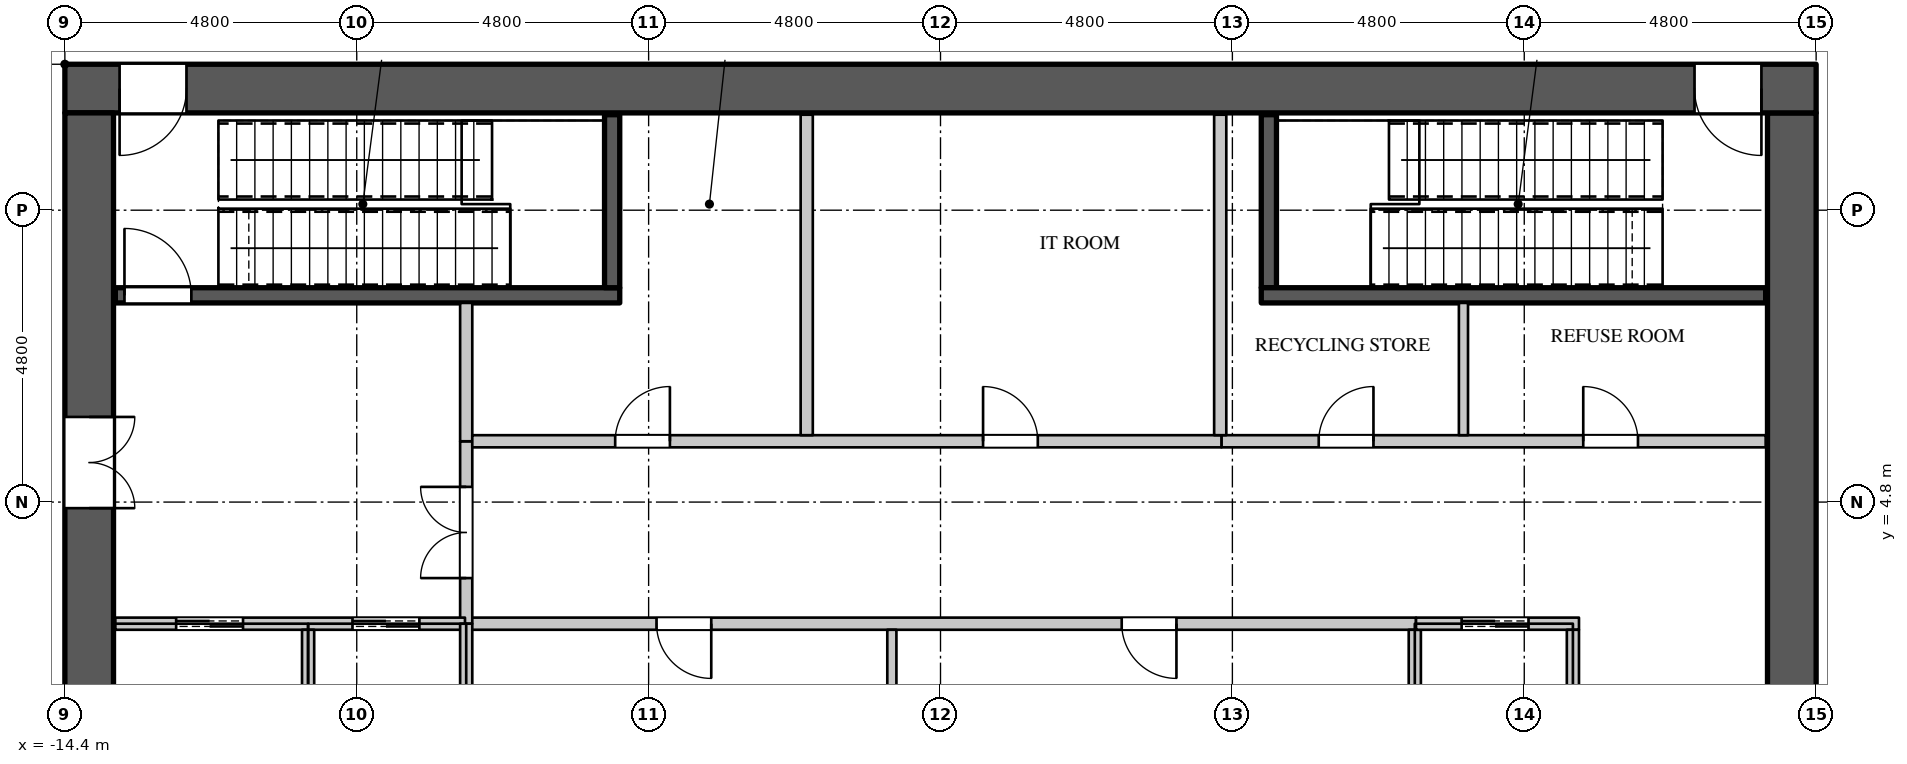
"""IFC4 building model, lengths in metres.
Left out: names, types, materials, properties, quantities, classifications, styles, units other than length and angle.
Written with IfcOpenShell. Run it as: python <this file> out.ifc"""

import sys

from ifc_helpers import new_model, si_unit, direction, frame, frame_2d, origin, place, context, subcontext, project, spatial, rectangle, extrude, element, fill, save


model = new_model("IFC4")
c1 = context("Model", 3, precision=1e-05, world=origin(), true_north=direction((0.0, 1.0)))
c2 = subcontext(c1, "Body", "Model", "MODEL_VIEW")
j1 = project(units=[si_unit("LENGTHUNIT", "METRE"), si_unit("PLANEANGLEUNIT", "RADIAN")], contexts=[c1])
p1 = place(None, origin())
s1 = spatial("IfcSite", under=j1, at=p1, CompositionType="ELEMENT")
p2 = place(p1, origin())
s2 = spatial("IfcBuilding", under=s1, at=p2, CompositionType="ELEMENT")
p3 = place(p2, frame((0.0, 0.0, 156.9)))
s3 = spatial("IfcBuildingStorey", under=s2, at=p3, CompositionType="ELEMENT", Elevation=156.9)
p4 = place(p3, frame((-14.4, 11.6, 0.0), z_axis=(0.0, 0.0, 1.0), x_axis=(1.0, 0.0, 0.0)))
e1 = element("IfcWall", 1, at=p4, inside=s3, PredefinedType="SHEAR", context=c2, shape_type="SweptSolid", body=[
    extrude(rectangle(XDim=28.8, YDim=0.8, at=frame_2d((14.4, 0.0))), origin(), (0.0, 0.0, 1.0), 5.4),
])
p5 = place(p4, frame((0.9, 0.0, 0.0)))
e2 = element("IfcOpeningElement", 2, at=p5, cuts=e1, PredefinedType="OPENING", context=c2, shape_type="SweptSolid", body=[
    extrude(rectangle(XDim=1.1, YDim=2.2, at=frame_2d((0.55, 1.1))), frame((0.0, 0.41, 0.0), z_axis=(0.0, -1.0, 0.0), x_axis=(1.0, 0.0, 0.0)), (0.0, 0.0, 1.0), 0.82),
])
p6 = place(p4, frame((26.8, 0.0, 0.0)))
e3 = element("IfcOpeningElement", 3, at=p6, cuts=e1, PredefinedType="OPENING", context=c2, shape_type="SweptSolid", body=[
    extrude(rectangle(XDim=1.1, YDim=2.2, at=frame_2d((0.55, 1.1))), frame((0.0, 0.41, 0.0), z_axis=(0.0, -1.0, 0.0), x_axis=(1.0, 0.0, 0.0)), (0.0, 0.0, 1.0), 0.82),
])
p7 = place(p3, frame((14.0, -11.2, 0.0), z_axis=(0.0, 0.0, 1.0), x_axis=(0.0, 1.0, 0.0)))
e4 = element("IfcWall", 4, at=p7, inside=s3, PredefinedType="SHEAR", context=c2, shape_type="SweptSolid", body=[
    extrude(rectangle(XDim=22.4, YDim=0.8, at=frame_2d((11.2, 0.0))), origin(), (0.0, 0.0, 1.0), 5.4),
])
p8 = place(p7, frame((10.4, 0.0, 0.0)))
e5 = element("IfcOpeningElement", 5, at=p8, cuts=e4, PredefinedType="OPENING", context=c2, shape_type="SweptSolid", body=[
    extrude(rectangle(XDim=1.5, YDim=2.4, at=frame_2d((0.75, 1.2))), frame((0.0, 0.41, 0.0), z_axis=(0.0, -1.0, 0.0), x_axis=(1.0, 0.0, 0.0)), (0.0, 0.0, 1.0), 0.82),
])
p9 = place(p3, frame((-14.0, -11.2, 0.0), z_axis=(0.0, 0.0, 1.0), x_axis=(0.0, 1.0, 0.0)))
e6 = element("IfcWall", 6, at=p9, inside=s3, PredefinedType="SHEAR", context=c2, shape_type="SweptSolid", body=[
    extrude(rectangle(XDim=22.4, YDim=0.8, at=frame_2d((11.2, 0.0))), origin(), (0.0, 0.0, 1.0), 5.4),
])
p10 = place(p9, frame((15.9, 0.0, 0.0)))
e7 = element("IfcOpeningElement", 7, at=p10, cuts=e6, PredefinedType="OPENING", context=c2, shape_type="SweptSolid", body=[
    extrude(rectangle(XDim=1.5, YDim=2.4, at=frame_2d((0.75, 1.2))), frame((0.0, 0.41, 0.0), z_axis=(0.0, -1.0, 0.0), x_axis=(1.0, 0.0, 0.0)), (0.0, 0.0, 1.0), 0.82),
])
p11 = place(p9, frame((4.9, 0.0, 0.0)))
e8 = element("IfcOpeningElement", 8, at=p11, cuts=e6, PredefinedType="OPENING", context=c2, shape_type="SweptSolid", body=[
    extrude(rectangle(XDim=1.5, YDim=2.4, at=frame_2d((0.75, 1.2))), frame((0.0, 0.41, 0.0), z_axis=(0.0, -1.0, 0.0), x_axis=(1.0, 0.0, 0.0)), (0.0, 0.0, 1.0), 0.82),
])
p12 = place(p3, frame((-7.82, 2.8, 0.0), z_axis=(0.0, 0.0, 1.0), x_axis=(1.0, 0.0, 0.0)))
e9 = element("IfcWall", 9, at=p12, inside=s3, PredefinedType="PARTITIONING", context=c2, shape_type="SweptSolid", body=[
    extrude(rectangle(XDim=15.64, YDim=0.2, at=frame_2d((7.82, 0.0))), origin(), (0.0, 0.0, 1.0), 5.1),
])
p13 = place(p12, frame((3.15, 0.0, 0.0)))
e10 = element("IfcOpeningElement", 10, at=p13, cuts=e9, PredefinedType="OPENING", context=c2, shape_type="SweptSolid", body=[
    extrude(rectangle(XDim=0.9, YDim=2.2, at=frame_2d((0.45, 1.1))), frame((0.0, 0.11, 0.0), z_axis=(0.0, -1.0, 0.0), x_axis=(1.0, 0.0, 0.0)), (0.0, 0.0, 1.0), 0.22),
])
p14 = place(p12, frame((10.8, 0.0, 0.0)))
e11 = element("IfcOpeningElement", 11, at=p14, cuts=e9, PredefinedType="OPENING", context=c2, shape_type="SweptSolid", body=[
    extrude(rectangle(XDim=0.9, YDim=2.2, at=frame_2d((0.45, 1.1))), frame((0.0, 0.11, 0.0), z_axis=(0.0, -1.0, 0.0), x_axis=(1.0, 0.0, 0.0)), (0.0, 0.0, 1.0), 0.22),
])
p15 = place(p3, frame((-7.8, 2.8, 0.0), z_axis=(0.0, 0.0, 1.0), x_axis=(0.0, 1.0, 0.0)))
e12 = element("IfcWall", 12, at=p15, inside=s3, PredefinedType="PARTITIONING", context=c2, shape_type="SweptSolid", body=[
    extrude(rectangle(XDim=3.0, YDim=0.2, at=frame_2d((1.5, 0.0))), origin(), (0.0, 0.0, 1.0), 5.1),
])
p16 = place(p15, frame((0.75, 0.0, 0.0)))
e13 = element("IfcOpeningElement", 13, at=p16, cuts=e12, PredefinedType="OPENING", context=c2, shape_type="SweptSolid", body=[
    extrude(rectangle(XDim=1.5, YDim=2.4, at=frame_2d((0.75, 1.2))), frame((0.0, 0.11, 0.0), z_axis=(0.0, -1.0, 0.0), x_axis=(1.0, 0.0, 0.0)), (0.0, 0.0, 1.0), 0.22),
])
p17 = place(p3, frame((4.62, 5.8, 0.0), z_axis=(0.0, 0.0, 1.0), x_axis=(1.0, 0.0, 0.0)))
e14 = element("IfcWall", 14, at=p17, inside=s3, PredefinedType="PARTITIONING", context=c2, shape_type="SweptSolid", body=[
    extrude(rectangle(XDim=8.95, YDim=0.2, at=frame_2d((4.475, 0.0))), origin(), (0.0, 0.0, 1.0), 5.1),
])
p18 = place(p17, frame((1.6, 0.0, 0.0)))
e15 = element("IfcOpeningElement", 15, at=p18, cuts=e14, PredefinedType="OPENING", context=c2, shape_type="SweptSolid", body=[
    extrude(rectangle(XDim=0.9, YDim=2.2, at=frame_2d((0.45, 1.1))), frame((0.0, 0.11, 0.0), z_axis=(0.0, -1.0, 0.0), x_axis=(1.0, 0.0, 0.0)), (0.0, 0.0, 1.0), 0.22),
])
p19 = place(p17, frame((5.95, 0.0, 0.0)))
e16 = element("IfcOpeningElement", 16, at=p19, cuts=e14, PredefinedType="OPENING", context=c2, shape_type="SweptSolid", body=[
    extrude(rectangle(XDim=0.9, YDim=2.2, at=frame_2d((0.45, 1.1))), frame((0.0, 0.11, 0.0), z_axis=(0.0, -1.0, 0.0), x_axis=(1.0, 0.0, 0.0)), (0.0, 0.0, 1.0), 0.22),
])
p20 = place(p3, frame((-0.8, 0.1, 0.0), z_axis=(0.0, 0.0, 1.0), x_axis=(0.0, 1.0, 0.0)))
e17 = element("IfcWall", 17, at=p20, inside=s3, PredefinedType="PARTITIONING", context=c2, shape_type="SweptSolid", body=[
    extrude(rectangle(XDim=2.6, YDim=0.15, at=frame_2d((1.3, 0.0))), origin(), (0.0, 0.0, 1.0), 5.1),
])
p21 = place(p3, frame((8.6, 5.9, 0.0), z_axis=(0.0, 0.0, 1.0), x_axis=(0.0, 1.0, 0.0)))
e18 = element("IfcWall", 18, at=p21, inside=s3, PredefinedType="PARTITIONING", context=c2, shape_type="SweptSolid", body=[
    extrude(rectangle(XDim=2.175, YDim=0.15, at=frame_2d((1.087, 0.0))), origin(), (0.0, 0.0, 1.0), 5.1),
])
p22 = place(p3, frame((-7.8, 5.8, 0.0), z_axis=(0.0, 0.0, 1.0), x_axis=(0.0, 1.0, 0.0)))
e19 = element("IfcWall", 19, at=p22, inside=s3, PredefinedType="PARTITIONING", context=c2, shape_type="SweptSolid", body=[
    extrude(rectangle(XDim=2.275, YDim=0.2, at=frame_2d((1.137, 0.0))), origin(), (0.0, 0.0, 1.0), 5.1),
])
p23 = place(p3, frame((-7.7, 5.8, 0.0), z_axis=(0.0, 0.0, 1.0), x_axis=(1.0, 0.0, 0.0)))
e20 = element("IfcWall", 20, at=p23, inside=s3, PredefinedType="PARTITIONING", context=c2, shape_type="SweptSolid", body=[
    extrude(rectangle(XDim=12.32, YDim=0.2, at=frame_2d((6.16, 0.0))), origin(), (0.0, 0.0, 1.0), 5.1),
])
p24 = place(p23, frame((2.35, 0.0, 0.0)))
e21 = element("IfcOpeningElement", 21, at=p24, cuts=e20, PredefinedType="OPENING", context=c2, shape_type="SweptSolid", body=[
    extrude(rectangle(XDim=0.9, YDim=2.2, at=frame_2d((0.45, 1.1))), frame((0.0, 0.11, 0.0), z_axis=(0.0, -1.0, 0.0), x_axis=(1.0, 0.0, 0.0)), (0.0, 0.0, 1.0), 0.22),
])
p25 = place(p23, frame((8.4, 0.0, 0.0)))
e22 = element("IfcOpeningElement", 22, at=p25, cuts=e20, PredefinedType="OPENING", context=c2, shape_type="SweptSolid", body=[
    extrude(rectangle(XDim=0.9, YDim=2.2, at=frame_2d((0.45, 1.1))), frame((0.0, 0.11, 0.0), z_axis=(0.0, -1.0, 0.0), x_axis=(1.0, 0.0, 0.0)), (0.0, 0.0, 1.0), 0.22),
])
for number, where, z_axis, x_axis in (
    (23, (-2.2, 5.9, 0.0), (0.0, 0.0, 1.0), (0.0, 1.0, 0.0)),
    (24, (4.6, 5.9, 0.0), (0.0, 0.0, 1.0), (0.0, 1.0, 0.0)),
):
    element("IfcWall", number, at=place(p3, frame(where, z_axis=z_axis, x_axis=x_axis)), inside=s3, PredefinedType="PARTITIONING", context=c2, shape_type="SweptSolid", body=[
        extrude(rectangle(XDim=5.27, YDim=0.2, at=frame_2d((2.635, 0.0))), origin(), (0.0, 0.0, 1.0), 5.1),
    ])
p26 = place(p3, frame((-13.57, 2.8, 0.0), z_axis=(0.0, 0.0, 1.0), x_axis=(1.0, 0.0, 0.0)))
e25 = element("IfcWall", 25, at=p26, inside=s3, PredefinedType="PARTITIONING", context=c2, shape_type="SweptSolid", body=[
    extrude(rectangle(XDim=5.75, YDim=0.2, at=frame_2d((2.875, 0.0))), origin(), (0.0, 0.0, 1.0), 5.1),
])
p27 = place(p26, frame((1.0, 0.0, 0.0)))
e26 = element("IfcOpeningElement", 26, at=p27, cuts=e25, PredefinedType="OPENING", context=c2, shape_type="SweptSolid", body=[
    extrude(rectangle(XDim=1.1, YDim=2.2, at=frame_2d((0.55, 1.1))), frame((0.0, 0.11, 0.0), z_axis=(0.0, -1.0, 0.0), x_axis=(1.0, 0.0, 0.0)), (0.0, 0.0, 1.0), 0.22),
])
p28 = place(p26, frame((3.9, 0.0, 0.0)))
e27 = element("IfcOpeningElement", 27, at=p28, cuts=e25, PredefinedType="OPENING", context=c2, shape_type="SweptSolid", body=[
    extrude(rectangle(XDim=1.1, YDim=2.2, at=frame_2d((0.55, 1.1))), frame((0.0, 0.11, 0.0), z_axis=(0.0, -1.0, 0.0), x_axis=(1.0, 0.0, 0.0)), (0.0, 0.0, 1.0), 0.22),
])
p29 = place(p3, frame((-10.4, 0.0, 0.0), z_axis=(0.0, 0.0, 1.0), x_axis=(0.0, 1.0, 0.0)))
e28 = element("IfcWall", 28, at=p29, inside=s3, PredefinedType="PARTITIONING", context=c2, shape_type="SweptSolid", body=[
    extrude(rectangle(XDim=2.7, YDim=0.2, at=frame_2d((1.35, 0.0))), origin(), (0.0, 0.0, 1.0), 5.1),
])
p30 = place(p3, frame((-7.8, 0.0, 0.0), z_axis=(0.0, 0.0, 1.0), x_axis=(0.0, 1.0, 0.0)))
e29 = element("IfcWall", 29, at=p30, inside=s3, PredefinedType="PARTITIONING", context=c2, shape_type="SweptSolid", body=[
    extrude(rectangle(XDim=2.8, YDim=0.2, at=frame_2d((1.4, 0.0))), origin(), (0.0, 0.0, 1.0), 5.1),
])
p31 = place(p3, frame((7.8, 0.0, 0.0), z_axis=(0.0, 0.0, 1.0), x_axis=(0.0, 1.0, 0.0)))
e30 = element("IfcWall", 30, at=p31, inside=s3, PredefinedType="PARTITIONING", context=c2, shape_type="SweptSolid", body=[
    extrude(rectangle(XDim=2.7, YDim=0.2, at=frame_2d((1.35, 0.0))), origin(), (0.0, 0.0, 1.0), 5.1),
])
p32 = place(p3, frame((7.82, 2.8, 0.0), z_axis=(0.0, 0.0, 1.0), x_axis=(1.0, 0.0, 0.0)))
e31 = element("IfcWall", 31, at=p32, inside=s3, PredefinedType="PARTITIONING", context=c2, shape_type="SweptSolid", body=[
    extrude(rectangle(XDim=2.68, YDim=0.2, at=frame_2d((1.34, 0.0))), origin(), (0.0, 0.0, 1.0), 5.1),
])
p33 = place(p32, frame((0.75, 0.0, 0.0)))
e32 = element("IfcOpeningElement", 32, at=p33, cuts=e31, PredefinedType="OPENING", context=c2, shape_type="SweptSolid", body=[
    extrude(rectangle(XDim=1.1, YDim=2.2, at=frame_2d((0.55, 1.1))), frame((0.0, 0.11, 0.0), z_axis=(0.0, -1.0, 0.0), x_axis=(1.0, 0.0, 0.0)), (0.0, 0.0, 1.0), 0.22),
])
p34 = place(p3, frame((10.4, -2.7, 0.0), z_axis=(0.0, 0.0, 1.0), x_axis=(0.0, 1.0, 0.0)))
e33 = element("IfcWall", 33, at=p34, inside=s3, PredefinedType="PARTITIONING", context=c2, shape_type="SweptSolid", body=[
    extrude(rectangle(XDim=5.4, YDim=0.2, at=frame_2d((2.7, 0.0))), origin(), (0.0, 0.0, 1.0), 5.1),
])
p35 = place(p3, frame((-13.57, 8.2, 0.0), z_axis=(0.0, 0.0, 1.0), x_axis=(1.0, 0.0, 0.0)))
e34 = element("IfcWall", 34, at=p35, inside=s3, PredefinedType="SHEAR", context=c2, shape_type="SweptSolid", body=[
    extrude(rectangle(XDim=8.295, YDim=0.25, at=frame_2d((4.147, 0.0))), origin(), (0.0, 0.0, 1.0), 5.15),
])
p36 = place(p35, frame((0.15, 0.0, 0.0)))
e35 = element("IfcOpeningElement", 35, at=p36, cuts=e34, PredefinedType="OPENING", context=c2, shape_type="SweptSolid", body=[
    extrude(rectangle(XDim=1.1, YDim=2.2, at=frame_2d((0.55, 1.1))), frame((0.0, 0.135, 0.0), z_axis=(0.0, -1.0, 0.0), x_axis=(1.0, 0.0, 0.0)), (0.0, 0.0, 1.0), 0.27),
])
for number, where, z_axis, x_axis in (
    (36, (-5.4, 8.325, 0.0), (0.0, 0.0, 1.0), (0.0, 1.0, 0.0)),
    (37, (5.4, 8.325, 0.0), (0.0, 0.0, 1.0), (0.0, 1.0, 0.0)),
):
    element("IfcWall", number, at=place(p3, frame(where, z_axis=z_axis, x_axis=x_axis)), inside=s3, PredefinedType="SHEAR", context=c2, shape_type="SweptSolid", body=[
        extrude(rectangle(XDim=2.845, YDim=0.25, at=frame_2d((1.422, 0.0))), origin(), (0.0, 0.0, 1.0), 5.15),
    ])
p37 = place(p3, frame((5.275, 8.2, 0.0), z_axis=(0.0, 0.0, 1.0), x_axis=(1.0, 0.0, 0.0)))
e38 = element("IfcWall", 38, at=p37, inside=s3, PredefinedType="SHEAR", context=c2, shape_type="SweptSolid", body=[
    extrude(rectangle(XDim=8.295, YDim=0.25, at=frame_2d((4.147, 0.0))), origin(), (0.0, 0.0, 1.0), 5.15),
])
p38 = place(p24, origin())
e39 = element("IfcDoor", 39, at=p38, inside=s3, OperationType="SINGLE_SWING_RIGHT", PredefinedType="DOOR", context=c2, shape_type="SweptSolid", body=[
    extrude(rectangle(XDim=0.9, YDim=2.2, at=frame_2d((0.45, 1.1))), frame((0.0, 0.025, 0.0), z_axis=(0.0, -1.0, 0.0), x_axis=(1.0, 0.0, 0.0)), (0.0, 0.0, 1.0), 0.05),
])
fill(e21, e39)
p39 = place(p25, origin())
e40 = element("IfcDoor", 40, at=p39, inside=s3, OperationType="SINGLE_SWING_LEFT", PredefinedType="DOOR", context=c2, shape_type="SweptSolid", body=[
    extrude(rectangle(XDim=0.9, YDim=2.2, at=frame_2d((0.45, 1.1))), frame((0.0, 0.025, 0.0), z_axis=(0.0, -1.0, 0.0), x_axis=(1.0, 0.0, 0.0)), (0.0, 0.0, 1.0), 0.05),
])
fill(e22, e40)
p40 = place(p18, origin())
e41 = element("IfcDoor", 41, at=p40, inside=s3, OperationType="SINGLE_SWING_RIGHT", PredefinedType="DOOR", context=c2, shape_type="SweptSolid", body=[
    extrude(rectangle(XDim=0.9, YDim=2.2, at=frame_2d((0.45, 1.1))), frame((0.0, 0.025, 0.0), z_axis=(0.0, -1.0, 0.0), x_axis=(1.0, 0.0, 0.0)), (0.0, 0.0, 1.0), 0.05),
])
fill(e15, e41)
p41 = place(p19, origin())
e42 = element("IfcDoor", 42, at=p41, inside=s3, OperationType="SINGLE_SWING_LEFT", PredefinedType="DOOR", context=c2, shape_type="SweptSolid", body=[
    extrude(rectangle(XDim=0.9, YDim=2.2, at=frame_2d((0.45, 1.1))), frame((0.0, 0.025, 0.0), z_axis=(0.0, -1.0, 0.0), x_axis=(1.0, 0.0, 0.0)), (0.0, 0.0, 1.0), 0.05),
])
fill(e16, e42)
p42 = place(p13, origin())
e43 = element("IfcDoor", 43, at=p42, inside=s3, OperationType="SINGLE_SWING_LEFT", PredefinedType="DOOR", context=c2, shape_type="SweptSolid", body=[
    extrude(rectangle(XDim=0.9, YDim=2.2, at=frame_2d((0.45, 1.1))), frame((0.0, 0.025, 0.0), z_axis=(0.0, -1.0, 0.0), x_axis=(1.0, 0.0, 0.0)), (0.0, 0.0, 1.0), 0.05),
])
fill(e10, e43)
p43 = place(p14, origin())
e44 = element("IfcDoor", 44, at=p43, inside=s3, OperationType="SINGLE_SWING_LEFT", PredefinedType="DOOR", context=c2, shape_type="SweptSolid", body=[
    extrude(rectangle(XDim=0.9, YDim=2.2, at=frame_2d((0.45, 1.1))), frame((0.0, 0.025, 0.0), z_axis=(0.0, -1.0, 0.0), x_axis=(1.0, 0.0, 0.0)), (0.0, 0.0, 1.0), 0.05),
])
fill(e11, e44)
p44 = place(p27, origin())
e45 = element("IfcDoor", 45, at=p44, inside=s3, OperationType="DOUBLE_DOOR_SLIDING", PredefinedType="DOOR", context=c2, shape_type="SweptSolid", body=[
    extrude(rectangle(XDim=1.1, YDim=2.2, at=frame_2d((0.55, 1.1))), frame((0.0, 0.025, 0.0), z_axis=(0.0, -1.0, 0.0), x_axis=(1.0, 0.0, 0.0)), (0.0, 0.0, 1.0), 0.05),
])
fill(e26, e45)
p45 = place(p28, origin())
e46 = element("IfcDoor", 46, at=p45, inside=s3, OperationType="DOUBLE_DOOR_SLIDING", PredefinedType="DOOR", context=c2, shape_type="SweptSolid", body=[
    extrude(rectangle(XDim=1.1, YDim=2.2, at=frame_2d((0.55, 1.1))), frame((0.0, 0.025, 0.0), z_axis=(0.0, -1.0, 0.0), x_axis=(1.0, 0.0, 0.0)), (0.0, 0.0, 1.0), 0.05),
])
fill(e27, e46)
p46 = place(p33, origin())
e47 = element("IfcDoor", 47, at=p46, inside=s3, OperationType="DOUBLE_DOOR_SLIDING", PredefinedType="DOOR", context=c2, shape_type="SweptSolid", body=[
    extrude(rectangle(XDim=1.1, YDim=2.2, at=frame_2d((0.55, 1.1))), frame((0.0, 0.025, 0.0), z_axis=(0.0, -1.0, 0.0), x_axis=(1.0, 0.0, 0.0)), (0.0, 0.0, 1.0), 0.05),
])
fill(e32, e47)
p47 = place(p36, origin())
e48 = element("IfcDoor", 48, at=p47, inside=s3, OperationType="SINGLE_SWING_LEFT", PredefinedType="DOOR", context=c2, shape_type="SweptSolid", body=[
    extrude(rectangle(XDim=1.1, YDim=2.2, at=frame_2d((0.55, 1.1))), frame((0.0, 0.025, 0.0), z_axis=(0.0, -1.0, 0.0), x_axis=(1.0, 0.0, 0.0)), (0.0, 0.0, 1.0), 0.05),
])
fill(e35, e48)
p48 = place(p16, origin())
e49 = element("IfcDoor", 49, at=p48, inside=s3, OperationType="DOUBLE_DOOR_SINGLE_SWING", PredefinedType="DOOR", context=c2, shape_type="SweptSolid", body=[
    extrude(rectangle(XDim=1.5, YDim=2.4, at=frame_2d((0.75, 1.2))), frame((0.0, 0.025, 0.0), z_axis=(0.0, -1.0, 0.0), x_axis=(1.0, 0.0, 0.0)), (0.0, 0.0, 1.0), 0.05),
])
fill(e13, e49)
p49 = place(p10, origin())
e50 = element("IfcDoor", 50, at=p49, inside=s3, OperationType="DOUBLE_DOOR_SINGLE_SWING", PredefinedType="DOOR", context=c2, shape_type="SweptSolid", body=[
    extrude(rectangle(XDim=1.5, YDim=2.4, at=frame_2d((0.75, 1.2))), frame((0.0, -0.345, 0.0), z_axis=(0.0, -1.0, 0.0), x_axis=(1.0, 0.0, 0.0)), (0.0, 0.0, 1.0), 0.05),
])
fill(e7, e50)
p50 = place(p5, origin())
e51 = element("IfcDoor", 51, at=p50, inside=s3, OperationType="SINGLE_SWING_RIGHT", PredefinedType="DOOR", context=c2, shape_type="SweptSolid", body=[
    extrude(rectangle(XDim=1.1, YDim=2.2, at=frame_2d((0.55, 1.1))), frame((0.0, -0.345, 0.0), z_axis=(0.0, -1.0, 0.0), x_axis=(1.0, 0.0, 0.0)), (0.0, 0.0, 1.0), 0.05),
])
fill(e2, e51)
p51 = place(p6, origin())
e52 = element("IfcDoor", 52, at=p51, inside=s3, OperationType="SINGLE_SWING_LEFT", PredefinedType="DOOR", context=c2, shape_type="SweptSolid", body=[
    extrude(rectangle(XDim=1.1, YDim=2.2, at=frame_2d((0.55, 1.1))), frame((0.0, -0.345, 0.0), z_axis=(0.0, -1.0, 0.0), x_axis=(1.0, 0.0, 0.0)), (0.0, 0.0, 1.0), 0.05),
])
fill(e3, e52)
save(model, sys.argv[1])
